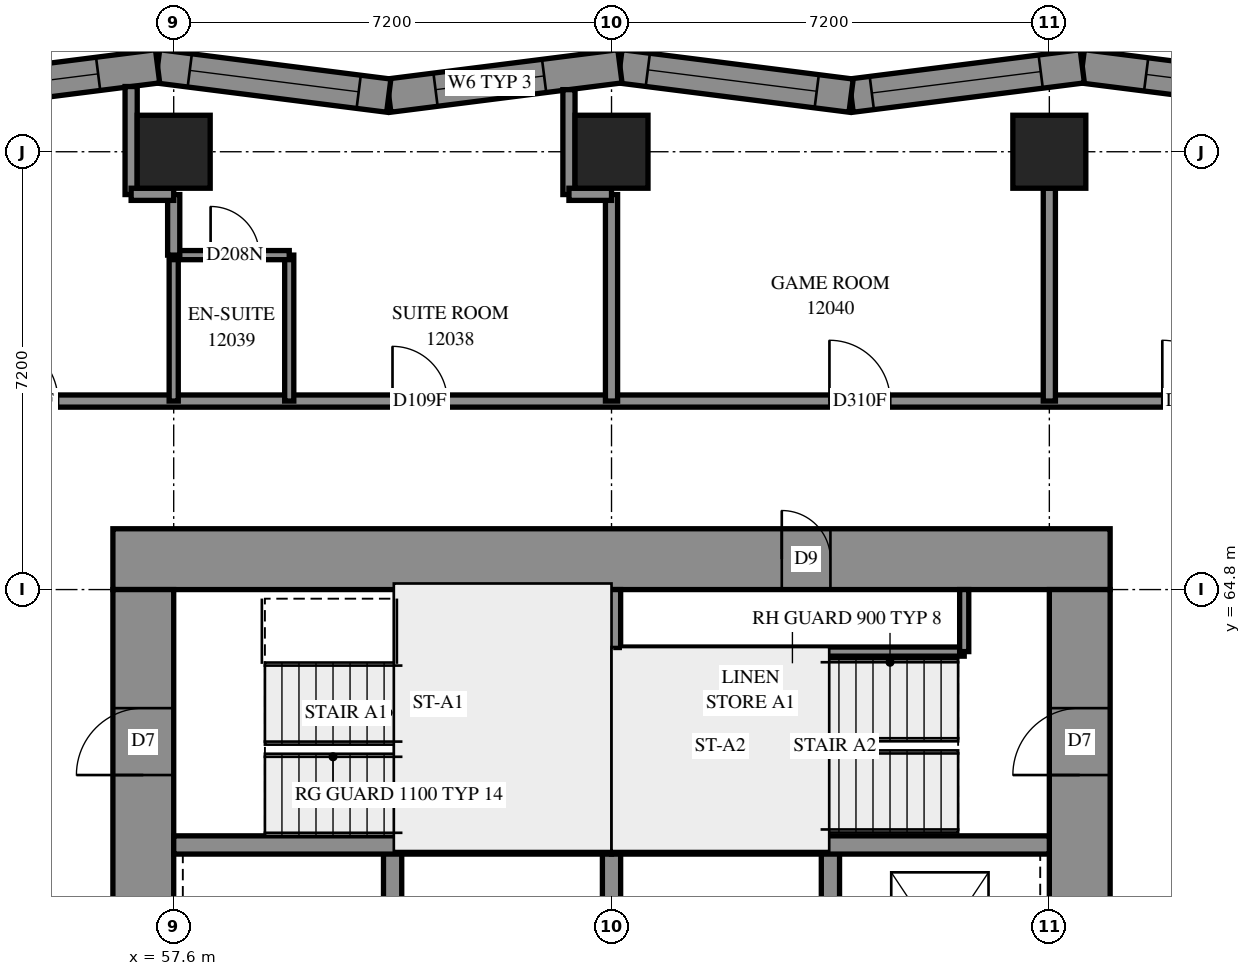
"""IFC4 building model, lengths in metres.
Left out: names, types, materials, properties, quantities, classifications, styles, units other than length and angle.
Written with IfcOpenShell. Run it as: python <this file> out.ifc"""

import sys

from ifc_helpers import new_model, si_unit, direction, frame, frame_2d, origin, origin_2d, place, context, subcontext, project, spatial, polyline, rectangle, outline, extrude, element, fill, save


model = new_model("IFC4")
c1 = context("Model", 3, precision=1e-05, world=origin(), true_north=direction((0.0, 1.0)))
c2 = subcontext(c1, "Body", "Model", "MODEL_VIEW")
j1 = project(units=[si_unit("LENGTHUNIT", "METRE"), si_unit("PLANEANGLEUNIT", "RADIAN")], contexts=[c1])
p1 = place(None, origin())
s1 = spatial("IfcSite", under=j1, at=p1, CompositionType="ELEMENT")
p2 = place(p1, origin())
s2 = spatial("IfcBuilding", under=s1, at=p2, CompositionType="ELEMENT")
p3 = place(p2, frame((0.0, 0.0, 47.4)))
s3 = spatial("IfcBuildingStorey", under=s2, at=p3, CompositionType="ELEMENT", Elevation=47.4)
for number, where, z_axis, x_axis in (
    (1, (57.6, 72.0, 0.0), (0.0, 0.0, 1.0), (1.0, 0.0, 0.0)),
    (2, (64.8, 72.0, 0.0), (0.0, 0.0, 1.0), (1.0, 0.0, 0.0)),
    (3, (72.0, 72.0, 0.0), (0.0, 0.0, 1.0), (1.0, 0.0, 0.0)),
):
    element("IfcColumn", number, at=place(p3, frame(where, z_axis=z_axis, x_axis=x_axis)), inside=s3, PredefinedType="COLUMN", context=c2, shape_type="SweptSolid", body=[
        extrude(rectangle(XDim=1.2, YDim=1.2, at=origin_2d()), origin(), (0.0, 0.0, 1.0), 3.1),
    ])
p4 = place(p3, frame((56.6, 65.3, -0.3), z_axis=(0.0, 0.0, 1.0), x_axis=(1.0, 0.0, 0.0)))
e4 = element("IfcWall", 4, at=p4, inside=s3, PredefinedType="SHEAR", context=c2, shape_type="SweptSolid", body=[
    extrude(rectangle(XDim=16.4, YDim=1.0, at=frame_2d((8.2, 0.0))), origin(), (0.0, 0.0, 1.0), 2.7),
])
p5 = place(p4, frame((11.0, 0.0, 0.3)))
e5 = element("IfcOpeningElement", 5, at=p5, cuts=e4, PredefinedType="OPENING", context=c2, shape_type="SweptSolid", body=[
    extrude(rectangle(XDim=0.8, YDim=2.1, at=frame_2d((0.4, 1.05))), frame((0.0, 0.51, 0.0), z_axis=(0.0, -1.0, 0.0), x_axis=(1.0, 0.0, 0.0)), (0.0, 0.0, 1.0), 1.02),
])
p6 = place(p3, frame((57.1, 50.4, -0.3), z_axis=(0.0, 0.0, 1.0), x_axis=(0.0, 1.0, 0.0)))
e6 = element("IfcWall", 6, at=p6, inside=s3, PredefinedType="SHEAR", context=c2, shape_type="SweptSolid", body=[
    extrude(rectangle(XDim=14.4, YDim=1.0, at=frame_2d((7.2, 0.0))), origin(), (0.0, 0.0, 1.0), 2.7),
])
p7 = place(p6, frame((4.55, 0.0, 0.3)))
e7 = element("IfcOpeningElement", 7, at=p7, cuts=e6, PredefinedType="OPENING", context=c2, shape_type="SweptSolid", body=[
    extrude(rectangle(XDim=1.1, YDim=2.1, at=frame_2d((0.55, 1.05))), frame((0.0, 0.51, 0.0), z_axis=(0.0, -1.0, 0.0), x_axis=(1.0, 0.0, 0.0)), (0.0, 0.0, 1.0), 1.02),
])
p8 = place(p6, frame((11.35, 0.0, 0.3)))
e8 = element("IfcOpeningElement", 8, at=p8, cuts=e6, PredefinedType="OPENING", context=c2, shape_type="SweptSolid", body=[
    extrude(rectangle(XDim=1.1, YDim=2.1, at=frame_2d((0.55, 1.05))), frame((0.0, 0.51, 0.0), z_axis=(0.0, -1.0, 0.0), x_axis=(1.0, 0.0, 0.0)), (0.0, 0.0, 1.0), 1.02),
])
p9 = place(p3, frame((72.5, 50.4, -0.3), z_axis=(0.0, 0.0, 1.0), x_axis=(0.0, 1.0, 0.0)))
e9 = element("IfcWall", 9, at=p9, inside=s3, PredefinedType="SHEAR", context=c2, shape_type="SweptSolid", body=[
    extrude(rectangle(XDim=14.4, YDim=1.0, at=frame_2d((7.2, 0.0))), origin(), (0.0, 0.0, 1.0), 2.7),
])
p10 = place(p9, frame((4.55, 0.0, 0.3)))
e10 = element("IfcOpeningElement", 10, at=p10, cuts=e9, PredefinedType="OPENING", context=c2, shape_type="SweptSolid", body=[
    extrude(rectangle(XDim=1.1, YDim=2.1, at=frame_2d((0.55, 1.05))), frame((0.0, 0.51, 0.0), z_axis=(0.0, -1.0, 0.0), x_axis=(1.0, 0.0, 0.0)), (0.0, 0.0, 1.0), 1.02),
])
p11 = place(p9, frame((11.35, 0.0, 0.3)))
e11 = element("IfcOpeningElement", 11, at=p11, cuts=e9, PredefinedType="OPENING", context=c2, shape_type="SweptSolid", body=[
    extrude(rectangle(XDim=1.1, YDim=2.1, at=frame_2d((0.55, 1.05))), frame((0.0, 0.51, 0.0), z_axis=(0.0, -1.0, 0.0), x_axis=(1.0, 0.0, 0.0)), (0.0, 0.0, 1.0), 1.02),
])
for number, where, z_axis, x_axis in (
    (12, (61.2, 57.3, 0.0), (0.0, 0.0, 1.0), (0.0, 1.0, 0.0)),
    (13, (64.8, 57.3, 0.0), (0.0, 0.0, 1.0), (0.0, 1.0, 0.0)),
    (14, (68.4, 57.3, 0.0), (0.0, 0.0, 1.0), (0.0, 1.0, 0.0)),
):
    element("IfcWall", number, at=place(p3, frame(where, z_axis=z_axis, x_axis=x_axis)), inside=s3, PredefinedType="SOLIDWALL", context=c2, shape_type="SweptSolid", body=[
        extrude(rectangle(XDim=3.3, YDim=0.3, at=frame_2d((1.65, 0.0))), origin(), (0.0, 0.0, 1.0), 3.1),
    ])
for number, where, z_axis, x_axis in (
    (15, (57.6, 60.6, 0.0), (0.0, 0.0, 1.0), (1.0, 0.0, 0.0)),
    (16, (64.8, 60.6, 0.0), (0.0, 0.0, 1.0), (1.0, 0.0, 0.0)),
):
    element("IfcWall", number, at=place(p3, frame(where, z_axis=z_axis, x_axis=x_axis)), inside=s3, PredefinedType="SOLIDWALL", context=c2, shape_type="SweptSolid", body=[
        extrude(rectangle(XDim=7.2, YDim=0.3, at=frame_2d((3.6, 0.0))), origin(), (0.0, 0.0, 1.0), 3.1),
    ])
p12 = place(p3, frame((64.8, 60.6, 0.0), z_axis=(0.0, 0.0, 1.0), x_axis=(0.0, 1.0, 0.0)))
e17 = element("IfcWall", 17, at=p12, inside=s3, PredefinedType="SOLIDWALL", context=c2, shape_type="SweptSolid", body=[
    extrude(rectangle(XDim=4.2, YDim=0.3, at=frame_2d((2.1, 0.0))), origin(), (0.0, 0.0, 1.0), 3.1),
])
p13 = place(p3, frame((76.365, 72.92, 0.0), z_axis=(0.0, 0.0, 1.0), x_axis=(-0.9920579561, 0.1257816033, 0.0)))
e18 = element("IfcWall", 18, at=p13, inside=s3, PredefinedType="SOLIDWALL", context=c2, shape_type="SweptSolid", body=[
    extrude(outline(polyline([(0.056, -0.275), (3.888, -0.275), (3.819, 0.275), (-0.056, 0.275), (0.056, -0.275)])), origin(), (0.0, 0.0, 1.0), 3.1),
])
p14 = place(p13, frame((1.595, 0.0, 0.5)))
e19 = element("IfcOpeningElement", 19, at=p14, cuts=e18, PredefinedType="OPENING", context=c2, shape_type="SweptSolid", body=[
    extrude(rectangle(XDim=1.2, YDim=2.45, at=frame_2d((0.6, 1.225))), frame((0.0, 0.285, 0.0), z_axis=(0.0, -1.0, 0.0), x_axis=(1.0, 0.0, 0.0)), (0.0, 0.0, 1.0), 0.57),
])
p15 = place(p3, frame((72.542, 73.405, 0.0), z_axis=(0.0, 0.0, 1.0), x_axis=(-0.9920583495, -0.1257785003, 0.0)))
e20 = element("IfcWall", 20, at=p15, inside=s3, PredefinedType="SOLIDWALL", context=c2, shape_type="SweptSolid", body=[
    extrude(outline(polyline([(-0.035, -0.275), (3.797, -0.275), (3.867, 0.275), (0.035, 0.275), (-0.035, -0.275)])), origin(), (0.0, 0.0, 1.0), 3.1),
])
p16 = place(p15, frame((0.689, 0.0, 0.5)))
e21 = element("IfcOpeningElement", 21, at=p16, cuts=e20, PredefinedType="OPENING", context=c2, shape_type="SweptSolid", body=[
    extrude(rectangle(XDim=2.8, YDim=2.45, at=frame_2d((1.4, 1.225))), frame((0.0, 0.285, 0.0), z_axis=(0.0, -1.0, 0.0), x_axis=(1.0, 0.0, 0.0)), (0.0, 0.0, 1.0), 0.57),
])
p17 = place(p3, frame((68.74, 72.923, 0.0), z_axis=(0.0, 0.0, 1.0), x_axis=(-0.9920583495, 0.1257785003, 0.0)))
e22 = element("IfcWall", 22, at=p17, inside=s3, PredefinedType="SOLIDWALL", context=c2, shape_type="SweptSolid", body=[
    extrude(outline(polyline([(0.035, -0.275), (3.867, -0.275), (3.797, 0.275), (-0.035, 0.275), (0.035, -0.275)])), origin(), (0.0, 0.0, 1.0), 3.1),
])
p18 = place(p17, frame((0.57, 0.0, 0.5)))
e23 = element("IfcOpeningElement", 23, at=p18, cuts=e22, PredefinedType="OPENING", context=c2, shape_type="SweptSolid", body=[
    extrude(rectangle(XDim=2.8, YDim=2.45, at=frame_2d((1.4, 1.225))), frame((0.0, 0.285, 0.0), z_axis=(0.0, -1.0, 0.0), x_axis=(1.0, 0.0, 0.0)), (0.0, 0.0, 1.0), 0.57),
])
p19 = place(p3, frame((64.939, 73.405, 0.0), z_axis=(0.0, 0.0, 1.0), x_axis=(-0.9920583495, -0.1257785003, 0.0)))
e24 = element("IfcWall", 24, at=p19, inside=s3, PredefinedType="SOLIDWALL", context=c2, shape_type="SweptSolid", body=[
    extrude(outline(polyline([(-0.035, -0.275), (3.797, -0.275), (3.867, 0.275), (0.035, 0.275), (-0.035, -0.275)])), origin(), (0.0, 0.0, 1.0), 3.1),
])
p20 = place(p19, frame((1.257, 0.0, 0.7)))
e25 = element("IfcOpeningElement", 25, at=p20, cuts=e24, PredefinedType="OPENING", context=c2, shape_type="SweptSolid", body=[
    extrude(rectangle(XDim=1.8, YDim=2.2, at=frame_2d((0.9, 1.1))), frame((0.0, 0.285, 0.0), z_axis=(0.0, -1.0, 0.0), x_axis=(1.0, 0.0, 0.0)), (0.0, 0.0, 1.0), 0.57),
])
p21 = place(p3, frame((61.137, 72.923, 0.0), z_axis=(0.0, 0.0, 1.0), x_axis=(-0.9920587623, 0.1257752442, 0.0)))
e26 = element("IfcWall", 26, at=p21, inside=s3, PredefinedType="SOLIDWALL", context=c2, shape_type="SweptSolid", body=[
    extrude(outline(polyline([(0.035, -0.275), (3.867, -0.275), (3.797, 0.275), (-0.035, 0.275), (0.035, -0.275)])), origin(), (0.0, 0.0, 1.0), 3.1),
])
p22 = place(p21, frame((0.499, 0.0, 0.5)))
e27 = element("IfcOpeningElement", 27, at=p22, cuts=e26, PredefinedType="OPENING", context=c2, shape_type="SweptSolid", body=[
    extrude(rectangle(XDim=2.8, YDim=2.45, at=frame_2d((1.4, 1.225))), frame((0.0, 0.285, 0.0), z_axis=(0.0, -1.0, 0.0), x_axis=(1.0, 0.0, 0.0)), (0.0, 0.0, 1.0), 0.57),
])
p23 = place(p3, frame((57.335, 73.405, 0.0), z_axis=(0.0, 0.0, 1.0), x_axis=(-0.9920583495, -0.1257785003, 0.0)))
e28 = element("IfcWall", 28, at=p23, inside=s3, PredefinedType="SOLIDWALL", context=c2, shape_type="SweptSolid", body=[
    extrude(outline(polyline([(-0.035, -0.275), (3.797, -0.275), (3.867, 0.275), (0.035, 0.275), (-0.035, -0.275)])), origin(), (0.0, 0.0, 1.0), 3.1),
])
p24 = place(p23, frame((0.986, 0.0, 0.7)))
e29 = element("IfcOpeningElement", 29, at=p24, cuts=e28, PredefinedType="OPENING", context=c2, shape_type="SweptSolid", body=[
    extrude(rectangle(XDim=1.8, YDim=2.2, at=frame_2d((0.9, 1.1))), frame((0.0, 0.285, 0.0), z_axis=(0.0, -1.0, 0.0), x_axis=(1.0, 0.0, 0.0)), (0.0, 0.0, 1.0), 0.57),
])
p25 = place(p3, frame((64.95, 63.78, 0.0), z_axis=(0.0, 0.0, 1.0), x_axis=(1.0, 0.0, 0.0)))
e30 = element("IfcWall", 30, at=p25, inside=s3, PredefinedType="PARTITIONING", context=c2, shape_type="SweptSolid", body=[
    extrude(rectangle(XDim=5.65, YDim=0.15, at=frame_2d((2.825, 0.0))), origin(), (0.0, 0.0, 1.0), 3.1),
])
p26 = place(p3, frame((70.6, 63.78, 0.0), z_axis=(0.0, 0.0, 1.0), x_axis=(0.0, 1.0, 0.0)))
e31 = element("IfcWall", 31, at=p26, inside=s3, PredefinedType="PARTITIONING", context=c2, shape_type="SweptSolid", body=[
    extrude(rectangle(XDim=1.02, YDim=0.15, at=frame_2d((0.51, 0.0))), origin(), (0.0, 0.0, 1.0), 3.1),
])
p27 = place(p3, frame((54.5, 67.9, 0.0), z_axis=(0.0, 0.0, 1.0), x_axis=(1.0, 0.0, 0.0)))
e32 = element("IfcWall", 32, at=p27, inside=s3, PredefinedType="PARTITIONING", context=c2, shape_type="SweptSolid", body=[
    extrude(rectangle(XDim=20.6, YDim=0.2, at=frame_2d((10.3, 0.0))), origin(), (0.0, 0.0, 1.0), 3.1),
])
p28 = place(p27, frame((0.198, 0.0, 0.0)))
e33 = element("IfcOpeningElement", 33, at=p28, cuts=e32, PredefinedType="OPENING", context=c2, shape_type="SweptSolid", body=[
    extrude(rectangle(XDim=1.0, YDim=2.1, at=frame_2d((0.5, 1.05))), frame((0.0, 0.11, 0.0), z_axis=(0.0, -1.0, 0.0), x_axis=(1.0, 0.0, 0.0)), (0.0, 0.0, 1.0), 0.22),
])
p29 = place(p27, frame((19.358, 0.0, 0.0)))
e34 = element("IfcOpeningElement", 34, at=p29, cuts=e32, PredefinedType="OPENING", context=c2, shape_type="SweptSolid", body=[
    extrude(rectangle(XDim=1.0, YDim=2.1, at=frame_2d((0.5, 1.05))), frame((0.0, 0.11, 0.0), z_axis=(0.0, -1.0, 0.0), x_axis=(1.0, 0.0, 0.0)), (0.0, 0.0, 1.0), 0.22),
])
p30 = place(p27, frame((6.698, 0.0, 0.0)))
e35 = element("IfcOpeningElement", 35, at=p30, cuts=e32, PredefinedType="OPENING", context=c2, shape_type="SweptSolid", body=[
    extrude(rectangle(XDim=0.9, YDim=2.1, at=frame_2d((0.45, 1.05))), frame((0.0, 0.11, 0.0), z_axis=(0.0, -1.0, 0.0), x_axis=(1.0, 0.0, 0.0)), (0.0, 0.0, 1.0), 0.22),
])
p31 = place(p27, frame((13.884, 0.0, 0.0)))
e36 = element("IfcOpeningElement", 36, at=p31, cuts=e32, PredefinedType="OPENING", context=c2, shape_type="SweptSolid", body=[
    extrude(rectangle(XDim=1.0, YDim=2.1, at=frame_2d((0.5, 1.05))), frame((0.0, 0.11, 0.0), z_axis=(0.0, -1.0, 0.0), x_axis=(1.0, 0.0, 0.0)), (0.0, 0.0, 1.0), 0.22),
])
p32 = place(p3, frame((72.0, 67.9, 0.0), z_axis=(0.0, 0.0, 1.0), x_axis=(0.0, 1.0, 0.0)))
e37 = element("IfcWall", 37, at=p32, inside=s3, PredefinedType="PARTITIONING", context=c2, shape_type="SweptSolid", body=[
    extrude(rectangle(XDim=3.5, YDim=0.2, at=frame_2d((1.75, 0.0))), origin(), (0.0, 0.0, 1.0), 3.1),
])
p33 = place(p3, frame((64.8, 67.9, 0.0), z_axis=(0.0, 0.0, 1.0), x_axis=(0.0, 1.0, 0.0)))
e38 = element("IfcWall", 38, at=p33, inside=s3, PredefinedType="PARTITIONING", context=c2, shape_type="SweptSolid", body=[
    extrude(rectangle(XDim=3.396, YDim=0.2, at=frame_2d((1.698, 0.0))), origin(), (0.0, 0.0, 1.0), 3.1),
])
for number, where, z_axis, x_axis in (
    (39, (59.5, 67.9, 0.0), (0.0, 0.0, 1.0), (0.0, 1.0, 0.0)),
    (40, (57.6, 67.9, 0.0), (0.0, 0.0, 1.0), (0.0, 1.0, 0.0)),
):
    element("IfcWall", number, at=place(p3, frame(where, z_axis=z_axis, x_axis=x_axis)), inside=s3, PredefinedType="PARTITIONING", context=c2, shape_type="SweptSolid", body=[
        extrude(rectangle(XDim=2.4, YDim=0.15, at=frame_2d((1.2, 0.0))), origin(), (0.0, 0.0, 1.0), 3.1),
    ])
p34 = place(p3, frame((57.6, 70.3, 0.0), z_axis=(0.0, 0.0, 1.0), x_axis=(1.0, 0.0, 0.0)))
e41 = element("IfcWall", 41, at=p34, inside=s3, PredefinedType="PARTITIONING", context=c2, shape_type="SweptSolid", body=[
    extrude(rectangle(XDim=1.9, YDim=0.15, at=frame_2d((0.95, 0.0))), origin(), (0.0, 0.0, 1.0), 3.1),
])
p35 = place(p34, frame((0.607, 0.0, 0.0)))
e42 = element("IfcOpeningElement", 42, at=p35, cuts=e41, PredefinedType="OPENING", context=c2, shape_type="SweptSolid", body=[
    extrude(rectangle(XDim=0.8, YDim=2.1, at=frame_2d((0.4, 1.05))), frame((0.0, 0.085, 0.0), z_axis=(0.0, -1.0, 0.0), x_axis=(1.0, 0.0, 0.0)), (0.0, 0.0, 1.0), 0.17),
])
p36 = place(p3, frame((56.9, 71.296, 0.0), z_axis=(0.0, 0.0, 1.0), x_axis=(0.0, 1.0, 0.0)))
e43 = element("IfcWall", 43, at=p36, inside=s3, PredefinedType="PARTITIONING", context=c2, shape_type="SweptSolid", body=[
    extrude(rectangle(XDim=1.776, YDim=0.2, at=frame_2d((0.888, 0.0))), origin(), (0.0, 0.0, 1.0), 3.1),
])
p37 = place(p3, frame((64.1, 71.296, 0.0), z_axis=(0.0, 0.0, 1.0), x_axis=(0.0, 1.0, 0.0)))
e44 = element("IfcWall", 44, at=p37, inside=s3, PredefinedType="PARTITIONING", context=c2, shape_type="SweptSolid", body=[
    extrude(rectangle(XDim=1.725, YDim=0.2, at=frame_2d((0.863, 0.0))), origin(), (0.0, 0.0, 1.0), 3.1),
])
p38 = place(p3, frame((57.6, 70.3, 0.0), z_axis=(0.0, 0.0, 1.0), x_axis=(0.0, 1.0, 0.0)))
e45 = element("IfcWall", 45, at=p38, inside=s3, PredefinedType="PARTITIONING", context=c2, shape_type="SweptSolid", body=[
    extrude(rectangle(XDim=0.996, YDim=0.2, at=frame_2d((0.498, 0.0))), origin(), (0.0, 0.0, 1.0), 3.1),
])
for number, where, z_axis, x_axis in (
    (46, (56.9, 71.3, 0.0), (0.0, 0.0, 1.0), (1.0, 0.0, 0.0)),
    (47, (64.1, 71.3, 0.0), (0.0, 0.0, 1.0), (1.0, 0.0, 0.0)),
):
    element("IfcWall", number, at=place(p3, frame(where, z_axis=z_axis, x_axis=x_axis)), inside=s3, PredefinedType="PARTITIONING", context=c2, shape_type="SweptSolid", body=[
        extrude(rectangle(XDim=0.7, YDim=0.2, at=frame_2d((0.35, 0.0))), origin(), (0.0, 0.0, 1.0), 3.1),
    ])
p39 = place(p14, origin())
e48 = element("IfcWindow", 48, at=p39, inside=s3, PartitioningType="SINGLE_PANEL", PredefinedType="WINDOW", context=c2, shape_type="SweptSolid", body=[
    extrude(rectangle(XDim=1.2, YDim=2.45, at=frame_2d((0.6, 1.225))), frame((0.0, 0.155, 0.0), z_axis=(0.0, -1.0, 0.0), x_axis=(1.0, 0.0, 0.0)), (0.0, 0.0, 1.0), 0.06),
])
fill(e19, e48)
p40 = place(p16, origin())
e49 = element("IfcWindow", 49, at=p40, inside=s3, PartitioningType="SINGLE_PANEL", PredefinedType="WINDOW", context=c2, shape_type="SweptSolid", body=[
    extrude(rectangle(XDim=2.8, YDim=2.45, at=frame_2d((1.4, 1.225))), frame((0.0, 0.155, 0.0), z_axis=(0.0, -1.0, 0.0), x_axis=(1.0, 0.0, 0.0)), (0.0, 0.0, 1.0), 0.06),
])
fill(e21, e49)
p41 = place(p18, origin())
e50 = element("IfcWindow", 50, at=p41, inside=s3, PartitioningType="SINGLE_PANEL", PredefinedType="WINDOW", context=c2, shape_type="SweptSolid", body=[
    extrude(rectangle(XDim=2.8, YDim=2.45, at=frame_2d((1.4, 1.225))), frame((0.0, 0.155, 0.0), z_axis=(0.0, -1.0, 0.0), x_axis=(1.0, 0.0, 0.0)), (0.0, 0.0, 1.0), 0.06),
])
fill(e23, e50)
p42 = place(p22, origin())
e51 = element("IfcWindow", 51, at=p42, inside=s3, PartitioningType="SINGLE_PANEL", PredefinedType="WINDOW", context=c2, shape_type="SweptSolid", body=[
    extrude(rectangle(XDim=2.8, YDim=2.45, at=frame_2d((1.4, 1.225))), frame((0.0, 0.155, 0.0), z_axis=(0.0, -1.0, 0.0), x_axis=(1.0, 0.0, 0.0)), (0.0, 0.0, 1.0), 0.06),
])
fill(e27, e51)
p43 = place(p5, origin())
e52 = element("IfcDoor", 52, at=p43, inside=s3, OperationType="SINGLE_SWING_RIGHT", PredefinedType="DOOR", context=c2, shape_type="SweptSolid", body=[
    extrude(rectangle(XDim=0.8, YDim=2.1, at=frame_2d((0.4, 1.05))), frame((0.0, -0.44, 0.0), z_axis=(0.0, -1.0, 0.0), x_axis=(1.0, 0.0, 0.0)), (0.0, 0.0, 1.0), 0.05),
])
fill(e5, e52)
p44 = place(p8, origin())
e53 = element("IfcDoor", 53, at=p44, inside=s3, OperationType="SINGLE_SWING_LEFT", PredefinedType="DOOR", context=c2, shape_type="SweptSolid", body=[
    extrude(rectangle(XDim=1.1, YDim=2.1, at=frame_2d((0.55, 1.05))), frame((0.0, 0.025, 0.0), z_axis=(0.0, -1.0, 0.0), x_axis=(1.0, 0.0, 0.0)), (0.0, 0.0, 1.0), 0.05),
])
fill(e8, e53)
p45 = place(p11, origin())
e54 = element("IfcDoor", 54, at=p45, inside=s3, OperationType="SINGLE_SWING_RIGHT", PredefinedType="DOOR", context=c2, shape_type="SweptSolid", body=[
    extrude(rectangle(XDim=1.1, YDim=2.1, at=frame_2d((0.55, 1.05))), frame((0.0, 0.025, 0.0), z_axis=(0.0, -1.0, 0.0), x_axis=(1.0, 0.0, 0.0)), (0.0, 0.0, 1.0), 0.05),
])
fill(e11, e54)
p46 = place(p28, origin())
e55 = element("IfcDoor", 55, at=p46, inside=s3, OperationType="SINGLE_SWING_LEFT", PredefinedType="DOOR", context=c2, shape_type="SweptSolid", body=[
    extrude(rectangle(XDim=1.0, YDim=2.1, at=frame_2d((0.5, 1.05))), frame((0.0, 0.025, 0.0), z_axis=(0.0, -1.0, 0.0), x_axis=(1.0, 0.0, 0.0)), (0.0, 0.0, 1.0), 0.05),
])
fill(e33, e55)
p47 = place(p29, origin())
e56 = element("IfcDoor", 56, at=p47, inside=s3, OperationType="SINGLE_SWING_RIGHT", PredefinedType="DOOR", context=c2, shape_type="SweptSolid", body=[
    extrude(rectangle(XDim=1.0, YDim=2.1, at=frame_2d((0.5, 1.05))), frame((0.0, 0.025, 0.0), z_axis=(0.0, -1.0, 0.0), x_axis=(1.0, 0.0, 0.0)), (0.0, 0.0, 1.0), 0.05),
])
fill(e34, e56)
p48 = place(p30, origin())
e57 = element("IfcDoor", 57, at=p48, inside=s3, OperationType="SINGLE_SWING_RIGHT", PredefinedType="DOOR", context=c2, shape_type="SweptSolid", body=[
    extrude(rectangle(XDim=0.9, YDim=2.1, at=frame_2d((0.45, 1.05))), frame((0.0, 0.025, 0.0), z_axis=(0.0, -1.0, 0.0), x_axis=(1.0, 0.0, 0.0)), (0.0, 0.0, 1.0), 0.05),
])
fill(e35, e57)
p49 = place(p35, origin())
e58 = element("IfcDoor", 58, at=p49, inside=s3, OperationType="SINGLE_SWING_RIGHT", PredefinedType="DOOR", context=c2, shape_type="SweptSolid", body=[
    extrude(rectangle(XDim=0.8, YDim=2.1, at=frame_2d((0.4, 1.05))), frame((0.0, 0.025, 0.0), z_axis=(0.0, -1.0, 0.0), x_axis=(1.0, 0.0, 0.0)), (0.0, 0.0, 1.0), 0.05),
])
fill(e42, e58)
p50 = place(p31, origin())
e59 = element("IfcDoor", 59, at=p50, inside=s3, OperationType="SINGLE_SWING_RIGHT", PredefinedType="DOOR", context=c2, shape_type="SweptSolid", body=[
    extrude(rectangle(XDim=1.0, YDim=2.1, at=frame_2d((0.5, 1.05))), frame((0.0, 0.025, 0.0), z_axis=(0.0, -1.0, 0.0), x_axis=(1.0, 0.0, 0.0)), (0.0, 0.0, 1.0), 0.05),
])
fill(e36, e59)
p51 = place(p20, origin())
e60 = element("IfcWindow", 60, at=p51, inside=s3, PartitioningType="SINGLE_PANEL", PredefinedType="WINDOW", context=c2, shape_type="SweptSolid", body=[
    extrude(rectangle(XDim=1.8, YDim=2.2, at=frame_2d((0.9, 1.1))), frame((0.0, 0.155, 0.0), z_axis=(0.0, -1.0, 0.0), x_axis=(1.0, 0.0, 0.0)), (0.0, 0.0, 1.0), 0.06),
])
fill(e25, e60)
p52 = place(p24, origin())
e61 = element("IfcWindow", 61, at=p52, inside=s3, PartitioningType="SINGLE_PANEL", PredefinedType="WINDOW", context=c2, shape_type="SweptSolid", body=[
    extrude(rectangle(XDim=1.8, YDim=2.2, at=frame_2d((0.9, 1.1))), frame((0.0, 0.155, 0.0), z_axis=(0.0, -1.0, 0.0), x_axis=(1.0, 0.0, 0.0)), (0.0, 0.0, 1.0), 0.06),
])
fill(e29, e61)
save(model, sys.argv[1])
